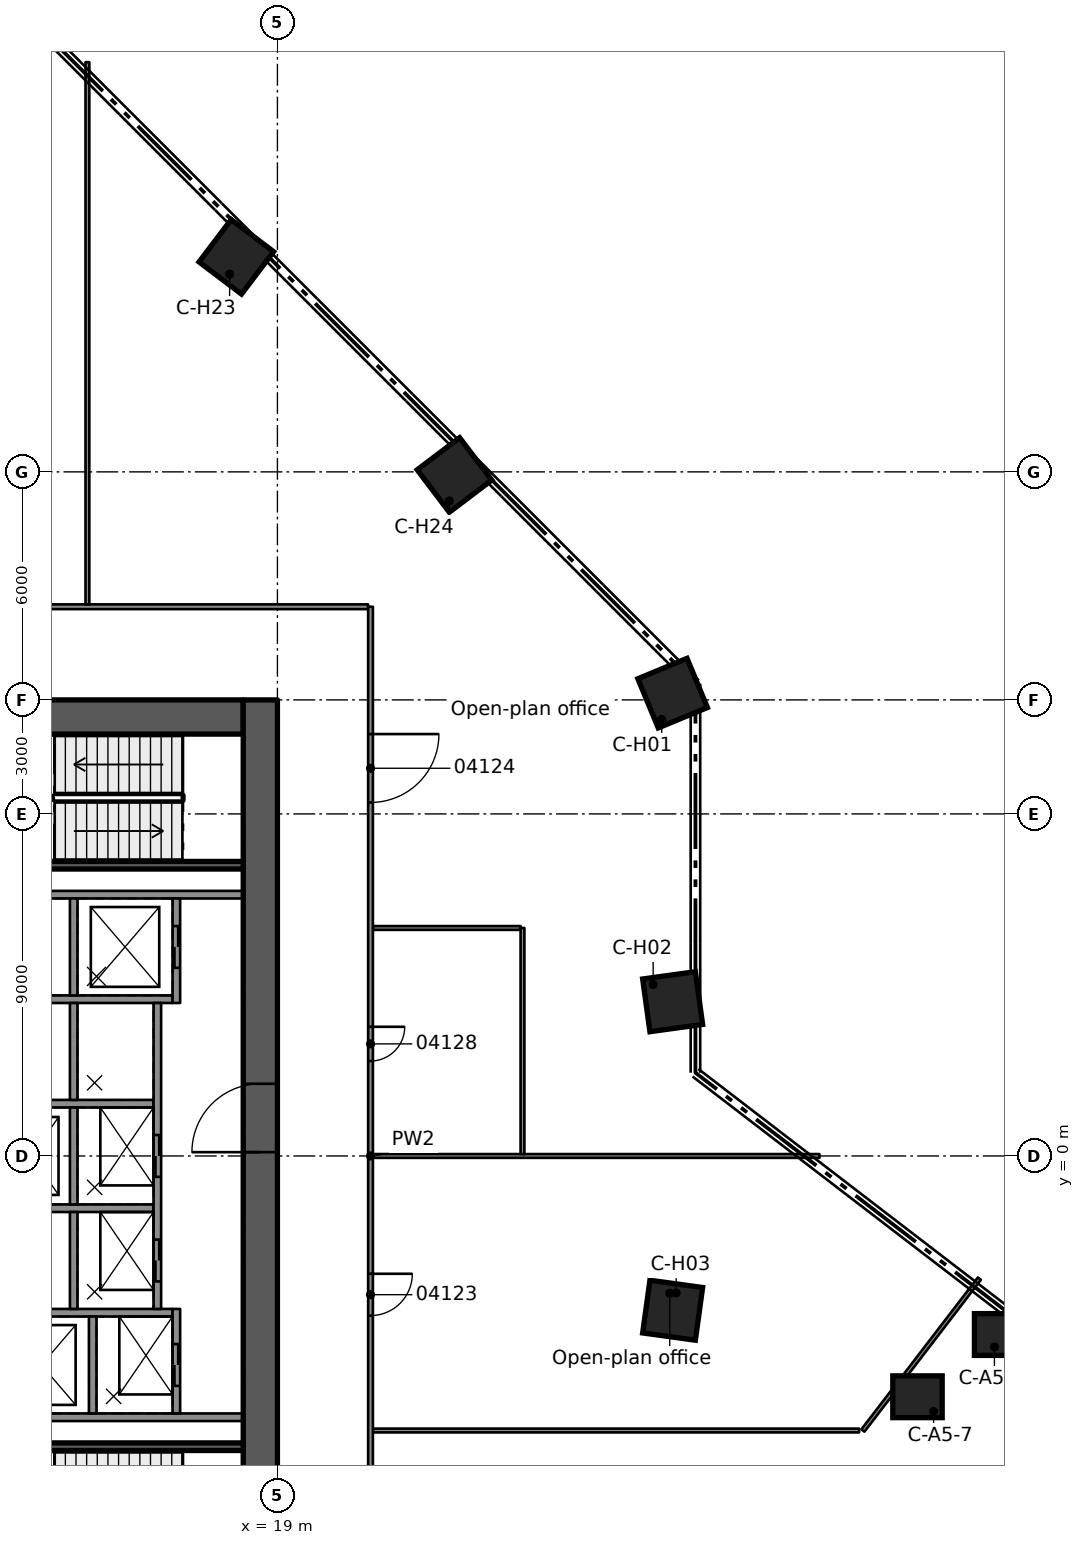
"""IFC4 building model, lengths in metres.
Left out: names, types, materials, properties, quantities, classifications, styles, units other than length and angle.
Written with IfcOpenShell. Run it as: python <this file> out.ifc"""

import sys

from ifc_helpers import new_model, si_unit, direction, frame, frame_2d, origin, origin_2d, place, context, subcontext, project, spatial, rectangle, extrude, element, fill, save


model = new_model("IFC4")
c1 = context("Model", 3, precision=1e-05, world=origin(), true_north=direction((0.0, 1.0)))
c2 = subcontext(c1, "Body", "Model", "MODEL_VIEW")
j1 = project(units=[si_unit("LENGTHUNIT", "METRE"), si_unit("PLANEANGLEUNIT", "RADIAN")], contexts=[c1])
p1 = place(None, origin())
s1 = spatial("IfcSite", under=j1, at=p1, CompositionType="ELEMENT")
p2 = place(p1, origin())
s2 = spatial("IfcBuilding", under=s1, at=p2, CompositionType="ELEMENT")
p3 = place(p2, frame((0.0, 0.0, 20.5)))
s3 = spatial("IfcBuildingStorey", under=s2, at=p3, CompositionType="ELEMENT", Elevation=20.5)
p4 = place(p3, frame((8.9, 11.55, 0.0), z_axis=(0.0, 0.0, 1.0), x_axis=(1.0, 0.0, 0.0)))
e1 = element("IfcWall", 1, at=p4, inside=s3, PredefinedType="SHEAR", context=c2, shape_type="SweptSolid", body=[
    extrude(rectangle(XDim=9.2, YDim=0.9, at=frame_2d((4.6, 0.0))), origin(), (0.0, 0.0, 1.0), 4.6),
])
p5 = place(p4, frame((3.0, 0.0, 0.0)))
e2 = element("IfcOpeningElement", 2, at=p5, cuts=e1, PredefinedType="OPENING", context=c2, shape_type="SweptSolid", body=[
    extrude(rectangle(XDim=1.1, YDim=2.1, at=frame_2d((0.55, 1.05))), frame((0.0, 0.46, 0.0), z_axis=(0.0, -1.0, 0.0), x_axis=(1.0, 0.0, 0.0)), (0.0, 0.0, 1.0), 0.92),
])
p6 = place(p3, frame((18.55, -12.0, 0.0), z_axis=(0.0, 0.0, 1.0), x_axis=(0.0, 1.0, 0.0)))
e3 = element("IfcWall", 3, at=p6, inside=s3, PredefinedType="SHEAR", context=c2, shape_type="SweptSolid", body=[
    extrude(rectangle(XDim=24.0, YDim=0.9, at=frame_2d((12.0, 0.0))), origin(), (0.0, 0.0, 1.0), 4.6),
])
p7 = place(p6, frame((12.1, 0.0, 0.0)))
e4 = element("IfcOpeningElement", 4, at=p7, cuts=e3, PredefinedType="OPENING", context=c2, shape_type="SweptSolid", body=[
    extrude(rectangle(XDim=1.8, YDim=2.1, at=frame_2d((0.9, 1.05))), frame((0.0, 0.46, 0.0), z_axis=(0.0, -1.0, 0.0), x_axis=(1.0, 0.0, 0.0)), (0.0, 0.0, 1.0), 0.92),
])
for number, where, z_axis, x_axis in (
    (5, (37.991, -4.698, 0.0), (0.0, 0.0, 1.0), (1.0, 0.0, 0.0)),
    (6, (35.843, -6.336, 0.0), (0.0, 0.0, 1.0), (1.0, 0.0, 0.0)),
):
    element("IfcColumn", number, at=place(p3, frame(where, z_axis=z_axis, x_axis=x_axis)), inside=s3, PredefinedType="COLUMN", context=c2, shape_type="SweptSolid", body=[
        extrude(rectangle(XDim=1.3, YDim=1.1, at=origin_2d()), origin(), (0.0, 0.0, 1.0), 4.6),
    ])
for number, where, z_axis, x_axis in (
    (7, (29.4, 12.178, 0.0), (0.0, 0.0, 1.0), (0.924, 0.383, 0.0)),
    (8, (29.4, 4.059, 0.0), (0.0, 0.0, 1.0), (0.991, 0.137, 0.0)),
    (9, (29.4, -4.059, 0.0), (0.0, 0.0, 1.0), (0.991, -0.137, 0.0)),
    (10, (12.178, 29.4, 0.0), (0.0, 0.0, 1.0), (0.383, 0.924, 0.0)),
    (11, (17.919, 23.659, 0.0), (0.0, 0.0, 1.0), (0.604, 0.797, 0.0)),
    (12, (23.659, 17.919, 0.0), (0.0, 0.0, 1.0), (0.797, 0.604, 0.0)),
):
    element("IfcColumn", number, at=place(p3, frame(where, z_axis=z_axis, x_axis=x_axis)), inside=s3, PredefinedType="COLUMN", context=c2, shape_type="SweptSolid", body=[
        extrude(rectangle(XDim=1.4, YDim=1.4, at=origin_2d()), origin(), (0.0, 0.0, 1.0), 4.6),
    ])
for number, where, z_axis, x_axis in (
    (13, (11.54, -6.875, 0.0), (0.0, 0.0, 1.0), (1.0, 0.0, 0.0)),
    (14, (11.54, 6.875, 0.0), (0.0, 0.0, 1.0), (1.0, 0.0, 0.0)),
):
    element("IfcWall", number, at=place(p3, frame(where, z_axis=z_axis, x_axis=x_axis)), inside=s3, PredefinedType="SOLIDWALL", context=c2, shape_type="SweptSolid", body=[
        extrude(rectangle(XDim=6.56, YDim=0.2, at=frame_2d((3.28, 0.0))), origin(), (0.0, 0.0, 1.0), 4.18),
    ])
p8 = place(p3, frame((11.54, 4.125, 0.0), z_axis=(0.0, 0.0, 1.0), x_axis=(1.0, 0.0, 0.0)))
e15 = element("IfcWall", 15, at=p8, inside=s3, PredefinedType="SOLIDWALL", context=c2, shape_type="SweptSolid", body=[
    extrude(rectangle(XDim=4.7, YDim=0.2, at=frame_2d((2.35, 0.0))), origin(), (0.0, 0.0, 1.0), 4.18),
])
for number, where, z_axis, x_axis in (
    (16, (11.54, 1.375, 0.0), (0.0, 0.0, 1.0), (1.0, 0.0, 0.0)),
    (17, (11.54, -1.375, 0.0), (0.0, 0.0, 1.0), (1.0, 0.0, 0.0)),
):
    element("IfcWall", number, at=place(p3, frame(where, z_axis=z_axis, x_axis=x_axis)), inside=s3, PredefinedType="SOLIDWALL", context=c2, shape_type="SweptSolid", body=[
        extrude(rectangle(XDim=4.2, YDim=0.2, at=frame_2d((2.1, 0.0))), origin(), (0.0, 0.0, 1.0), 4.18),
    ])
p9 = place(p3, frame((11.54, -4.125, 0.0), z_axis=(0.0, 0.0, 1.0), x_axis=(1.0, 0.0, 0.0)))
e18 = element("IfcWall", 18, at=p9, inside=s3, PredefinedType="SOLIDWALL", context=c2, shape_type="SweptSolid", body=[
    extrude(rectangle(XDim=4.7, YDim=0.2, at=frame_2d((2.35, 0.0))), origin(), (0.0, 0.0, 1.0), 4.18),
])
for number, where, z_axis, x_axis in (
    (19, (13.64, 6.775, 0.0), (0.0, 0.0, 1.0), (0.0, -1.0, 0.0)),
    (20, (13.64, 4.025, 0.0), (0.0, 0.0, 1.0), (0.0, -1.0, 0.0)),
    (21, (13.64, 1.275, 0.0), (0.0, 0.0, 1.0), (0.0, -1.0, 0.0)),
    (22, (13.64, -1.475, 0.0), (0.0, 0.0, 1.0), (0.0, -1.0, 0.0)),
    (23, (14.14, -4.225, 0.0), (0.0, 0.0, 1.0), (0.0, -1.0, 0.0)),
):
    element("IfcWall", number, at=place(p3, frame(where, z_axis=z_axis, x_axis=x_axis)), inside=s3, PredefinedType="SOLIDWALL", context=c2, shape_type="SweptSolid", body=[
        extrude(rectangle(XDim=2.55, YDim=0.2, at=frame_2d((1.275, 0.0))), origin(), (0.0, 0.0, 1.0), 4.18),
    ])
p10 = place(p3, frame((16.34, 6.775, 0.0), z_axis=(0.0, 0.0, 1.0), x_axis=(0.0, -1.0, 0.0)))
e24 = element("IfcWall", 24, at=p10, inside=s3, PredefinedType="SOLIDWALL", context=c2, shape_type="SweptSolid", body=[
    extrude(rectangle(XDim=2.75, YDim=0.2, at=frame_2d((1.375, 0.0))), origin(), (0.0, 0.0, 1.0), 4.18),
])
p11 = place(p10, frame((0.725, 0.0, 0.0)))
e25 = element("IfcOpeningElement", 25, at=p11, cuts=e24, PredefinedType="OPENING", context=c2, shape_type="SweptSolid", body=[
    extrude(rectangle(XDim=1.1, YDim=2.1, at=frame_2d((0.55, 1.05))), frame((0.0, 0.11, 0.0), z_axis=(0.0, -1.0, 0.0), x_axis=(1.0, 0.0, 0.0)), (0.0, 0.0, 1.0), 0.22),
])
p12 = place(p3, frame((15.84, 4.025, 0.0), z_axis=(0.0, 0.0, 1.0), x_axis=(0.0, -1.0, 0.0)))
e26 = element("IfcWall", 26, at=p12, inside=s3, PredefinedType="SOLIDWALL", context=c2, shape_type="SweptSolid", body=[
    extrude(rectangle(XDim=8.05, YDim=0.2, at=frame_2d((4.025, 0.0))), origin(), (0.0, 0.0, 1.0), 4.18),
])
p13 = place(p12, frame((3.475, 0.0, 0.0)))
e27 = element("IfcOpeningElement", 27, at=p13, cuts=e26, PredefinedType="OPENING", context=c2, shape_type="SweptSolid", body=[
    extrude(rectangle(XDim=1.1, YDim=2.1, at=frame_2d((0.55, 1.05))), frame((0.0, 0.11, 0.0), z_axis=(0.0, -1.0, 0.0), x_axis=(1.0, 0.0, 0.0)), (0.0, 0.0, 1.0), 0.22),
])
p14 = place(p12, frame((6.225, 0.0, 0.0)))
e28 = element("IfcOpeningElement", 28, at=p14, cuts=e26, PredefinedType="OPENING", context=c2, shape_type="SweptSolid", body=[
    extrude(rectangle(XDim=1.1, YDim=2.1, at=frame_2d((0.55, 1.05))), frame((0.0, 0.11, 0.0), z_axis=(0.0, -1.0, 0.0), x_axis=(1.0, 0.0, 0.0)), (0.0, 0.0, 1.0), 0.22),
])
p15 = place(p3, frame((16.34, -4.025, 0.0), z_axis=(0.0, 0.0, 1.0), x_axis=(0.0, -1.0, 0.0)))
e29 = element("IfcWall", 29, at=p15, inside=s3, PredefinedType="SOLIDWALL", context=c2, shape_type="SweptSolid", body=[
    extrude(rectangle(XDim=2.75, YDim=0.2, at=frame_2d((1.375, 0.0))), origin(), (0.0, 0.0, 1.0), 4.18),
])
p16 = place(p15, frame((0.925, 0.0, 0.0)))
e30 = element("IfcOpeningElement", 30, at=p16, cuts=e29, PredefinedType="OPENING", context=c2, shape_type="SweptSolid", body=[
    extrude(rectangle(XDim=1.1, YDim=2.1, at=frame_2d((0.55, 1.05))), frame((0.0, 0.11, 0.0), z_axis=(0.0, -1.0, 0.0), x_axis=(1.0, 0.0, 0.0)), (0.0, 0.0, 1.0), 0.22),
])
for number, where, z_axis, x_axis in (
    (31, (11.54, -7.65, 0.0), (0.0, 0.0, 1.0), (1.0, 0.0, 0.0)),
    (32, (11.54, 7.65, 0.0), (0.0, 0.0, 1.0), (1.0, 0.0, 0.0)),
):
    element("IfcWall", number, at=place(p3, frame(where, z_axis=z_axis, x_axis=x_axis)), inside=s3, PredefinedType="SOLIDWALL", context=c2, shape_type="SweptSolid", body=[
        extrude(rectangle(XDim=6.56, YDim=0.2, at=frame_2d((3.28, 0.0))), origin(), (0.0, 0.0, 1.0), 4.18),
    ])
p17 = place(p3, frame((21.512, -7.224, 0.0), z_axis=(0.0, 0.0, 1.0), x_axis=(1.0, 0.0, 0.0)))
e33 = element("IfcWall", 33, at=p17, inside=s3, PredefinedType="PARTITIONING", context=c2, shape_type="SweptSolid", body=[
    extrude(rectangle(XDim=12.794, YDim=0.1, at=frame_2d((6.397, 0.0))), origin(), (0.0, 0.0, 1.0), 4.16),
])
p18 = place(p3, frame((21.512, 0.0, 0.0), z_axis=(0.0, 0.0, 1.0), x_axis=(1.0, 0.0, 0.0)))
e34 = element("IfcWall", 34, at=p18, inside=s3, PredefinedType="PARTITIONING", context=c2, shape_type="SweptSolid", body=[
    extrude(rectangle(XDim=11.752, YDim=0.1, at=frame_2d((5.876, 0.0))), origin(), (0.0, 0.0, 1.0), 4.16),
])
p19 = place(p3, frame((21.512, 5.999, 0.0), z_axis=(0.0, 0.0, 1.0), x_axis=(1.0, 0.0, 0.0)))
e35 = element("IfcWall", 35, at=p19, inside=s3, PredefinedType="PARTITIONING", context=c2, shape_type="SweptSolid", body=[
    extrude(rectangle(XDim=3.887, YDim=0.1, at=frame_2d((1.943, 0.0))), origin(), (0.0, 0.0, 1.0), 4.16),
])
p20 = place(p3, frame((10.391, 14.451, 0.0), z_axis=(0.0, 0.0, 1.0), x_axis=(1.0, 0.0, 0.0)))
e36 = element("IfcWall", 36, at=p20, inside=s3, PredefinedType="PARTITIONING", context=c2, shape_type="SweptSolid", body=[
    extrude(rectangle(XDim=10.996, YDim=0.125, at=frame_2d((5.498, 0.0))), origin(), (0.0, 0.0, 1.0), 4.16),
])
p21 = place(p3, frame((41.84, -6.58, 0.0), z_axis=(0.0, 0.0, 1.0), x_axis=(-0.608763818445, -0.793351506807, 0.0)))
e37 = element("IfcWall", 37, at=p21, inside=s3, PredefinedType="PARTITIONING", context=c2, shape_type="SweptSolid", body=[
    extrude(rectangle(XDim=40.5, YDim=0.1, at=frame_2d((20.25, 0.0))), origin(), (0.0, 0.0, 1.0), 4.16),
])
p22 = place(p21, frame((19.75, 0.0, 0.0)))
e38 = element("IfcOpeningElement", 38, at=p22, cuts=e37, PredefinedType="OPENING", context=c2, shape_type="SweptSolid", body=[
    extrude(rectangle(XDim=0.9, YDim=2.1, at=frame_2d((0.45, 1.05))), frame((0.0, 0.06, 0.0), z_axis=(0.0, -1.0, 0.0), x_axis=(1.0, 0.0, 0.0)), (0.0, 0.0, 1.0), 0.12),
])
p23 = place(p3, frame((34.407, -7.224, 0.0), z_axis=(0.0, 0.0, 1.0), x_axis=(0.608468185558, 0.793578267825, 0.0)))
e39 = element("IfcWall", 39, at=p23, inside=s3, PredefinedType="PARTITIONING", context=c2, shape_type="SweptSolid", body=[
    extrude(rectangle(XDim=5.036, YDim=0.1, at=frame_2d((2.518, 0.0))), origin(), (0.0, 0.0, 1.0), 4.16),
])
p24 = place(p3, frame((25.449, 0.05, 0.0), z_axis=(0.0, 0.0, 1.0), x_axis=(0.0, 1.0, 0.0)))
e40 = element("IfcWall", 40, at=p24, inside=s3, PredefinedType="PARTITIONING", context=c2, shape_type="SweptSolid", body=[
    extrude(rectangle(XDim=5.949, YDim=0.1, at=frame_2d((2.975, 0.0))), origin(), (0.0, 0.0, 1.0), 4.16),
])
p25 = place(p3, frame((21.45, 14.451, 0.0), z_axis=(0.0, 0.0, 1.0), x_axis=(0.0, -1.0, 0.0)))
e41 = element("IfcWall", 41, at=p25, inside=s3, PredefinedType="PARTITIONING", context=c2, shape_type="SweptSolid", body=[
    extrude(rectangle(XDim=28.902, YDim=0.125, at=frame_2d((14.451, 0.0))), origin(), (0.0, 0.0, 1.0), 4.16),
])
p26 = place(p25, frame((24.275, 0.0, 0.0)))
e42 = element("IfcOpeningElement", 42, at=p26, cuts=e41, PredefinedType="OPENING", context=c2, shape_type="SweptSolid", body=[
    extrude(rectangle(XDim=2.1, YDim=2.1, at=frame_2d((1.05, 1.05))), frame((0.0, 0.073, 0.0), z_axis=(0.0, -1.0, 0.0), x_axis=(1.0, 0.0, 0.0)), (0.0, 0.0, 1.0), 0.145),
])
p27 = place(p25, frame((17.551, 0.0, 0.0)))
e43 = element("IfcOpeningElement", 43, at=p27, cuts=e41, PredefinedType="OPENING", context=c2, shape_type="SweptSolid", body=[
    extrude(rectangle(XDim=1.1, YDim=2.1, at=frame_2d((0.55, 1.05))), frame((0.0, 0.073, 0.0), z_axis=(0.0, -1.0, 0.0), x_axis=(1.0, 0.0, 0.0)), (0.0, 0.0, 1.0), 0.145),
])
p28 = place(p25, frame((3.35, 0.0, 0.0)))
e44 = element("IfcOpeningElement", 44, at=p28, cuts=e41, PredefinedType="OPENING", context=c2, shape_type="SweptSolid", body=[
    extrude(rectangle(XDim=1.8, YDim=2.1, at=frame_2d((0.9, 1.05))), frame((0.0, 0.073, 0.0), z_axis=(0.0, -1.0, 0.0), x_axis=(1.0, 0.0, 0.0)), (0.0, 0.0, 1.0), 0.145),
])
p29 = place(p25, frame((11.052, 0.0, 0.0)))
e45 = element("IfcOpeningElement", 45, at=p29, cuts=e41, PredefinedType="OPENING", context=c2, shape_type="SweptSolid", body=[
    extrude(rectangle(XDim=0.9, YDim=2.1, at=frame_2d((0.45, 1.05))), frame((0.0, 0.073, 0.0), z_axis=(0.0, -1.0, 0.0), x_axis=(1.0, 0.0, 0.0)), (0.0, 0.0, 1.0), 0.145),
])
p30 = place(p3, frame((14.0, 14.514, 0.0), z_axis=(0.0, 0.0, 1.0), x_axis=(0.0, 1.0, 0.0)))
e46 = element("IfcWall", 46, at=p30, inside=s3, PredefinedType="PARTITIONING", context=c2, shape_type="SweptSolid", body=[
    extrude(rectangle(XDim=14.266, YDim=0.1, at=frame_2d((7.133, 0.0))), origin(), (0.0, 0.0, 1.0), 4.16),
])
p31 = place(p11, origin())
e47 = element("IfcDoor", 47, at=p31, inside=s3, OperationType="DOUBLE_DOOR_SLIDING", PredefinedType="DOOR", context=c2, shape_type="SweptSolid", body=[
    extrude(rectangle(XDim=1.1, YDim=2.1, at=frame_2d((0.55, 1.05))), frame((0.0, 0.025, 0.0), z_axis=(0.0, -1.0, 0.0), x_axis=(1.0, 0.0, 0.0)), (0.0, 0.0, 1.0), 0.05),
])
fill(e25, e47)
p32 = place(p13, origin())
e48 = element("IfcDoor", 48, at=p32, inside=s3, OperationType="DOUBLE_DOOR_SLIDING", PredefinedType="DOOR", context=c2, shape_type="SweptSolid", body=[
    extrude(rectangle(XDim=1.1, YDim=2.1, at=frame_2d((0.55, 1.05))), frame((0.0, 0.025, 0.0), z_axis=(0.0, -1.0, 0.0), x_axis=(1.0, 0.0, 0.0)), (0.0, 0.0, 1.0), 0.05),
])
fill(e27, e48)
p33 = place(p14, origin())
e49 = element("IfcDoor", 49, at=p33, inside=s3, OperationType="DOUBLE_DOOR_SLIDING", PredefinedType="DOOR", context=c2, shape_type="SweptSolid", body=[
    extrude(rectangle(XDim=1.1, YDim=2.1, at=frame_2d((0.55, 1.05))), frame((0.0, 0.025, 0.0), z_axis=(0.0, -1.0, 0.0), x_axis=(1.0, 0.0, 0.0)), (0.0, 0.0, 1.0), 0.05),
])
fill(e28, e49)
p34 = place(p16, origin())
e50 = element("IfcDoor", 50, at=p34, inside=s3, OperationType="DOUBLE_DOOR_SLIDING", PredefinedType="DOOR", context=c2, shape_type="SweptSolid", body=[
    extrude(rectangle(XDim=1.1, YDim=2.1, at=frame_2d((0.55, 1.05))), frame((0.0, 0.025, 0.0), z_axis=(0.0, -1.0, 0.0), x_axis=(1.0, 0.0, 0.0)), (0.0, 0.0, 1.0), 0.05),
])
fill(e30, e50)
p35 = place(p7, origin())
e51 = element("IfcDoor", 51, at=p35, inside=s3, OperationType="SINGLE_SWING_RIGHT", PredefinedType="DOOR", context=c2, shape_type="SweptSolid", body=[
    extrude(rectangle(XDim=1.8, YDim=2.1, at=frame_2d((0.9, 1.05))), frame((0.0, 0.025, 0.0), z_axis=(0.0, -1.0, 0.0), x_axis=(1.0, 0.0, 0.0)), (0.0, 0.0, 1.0), 0.05),
])
fill(e4, e51)
p36 = place(p27, origin())
e52 = element("IfcDoor", 52, at=p36, inside=s3, OperationType="SINGLE_SWING_RIGHT", PredefinedType="DOOR", context=c2, shape_type="SweptSolid", body=[
    extrude(rectangle(XDim=1.1, YDim=2.1, at=frame_2d((0.55, 1.05))), frame((0.0, 0.025, 0.0), z_axis=(0.0, -1.0, 0.0), x_axis=(1.0, 0.0, 0.0)), (0.0, 0.0, 1.0), 0.05),
])
fill(e43, e52)
p37 = place(p28, origin())
e53 = element("IfcDoor", 53, at=p37, inside=s3, OperationType="DOUBLE_DOOR_SINGLE_SWING", PredefinedType="DOOR", context=c2, shape_type="SweptSolid", body=[
    extrude(rectangle(XDim=1.8, YDim=2.1, at=frame_2d((0.9, 1.05))), frame((0.0, 0.025, 0.0), z_axis=(0.0, -1.0, 0.0), x_axis=(1.0, 0.0, 0.0)), (0.0, 0.0, 1.0), 0.05),
])
fill(e44, e53)
p38 = place(p29, origin())
e54 = element("IfcDoor", 54, at=p38, inside=s3, OperationType="SINGLE_SWING_LEFT", PredefinedType="DOOR", context=c2, shape_type="SweptSolid", body=[
    extrude(rectangle(XDim=0.9, YDim=2.1, at=frame_2d((0.45, 1.05))), frame((0.0, 0.025, 0.0), z_axis=(0.0, -1.0, 0.0), x_axis=(1.0, 0.0, 0.0)), (0.0, 0.0, 1.0), 0.05),
])
fill(e45, e54)
save(model, sys.argv[1])
